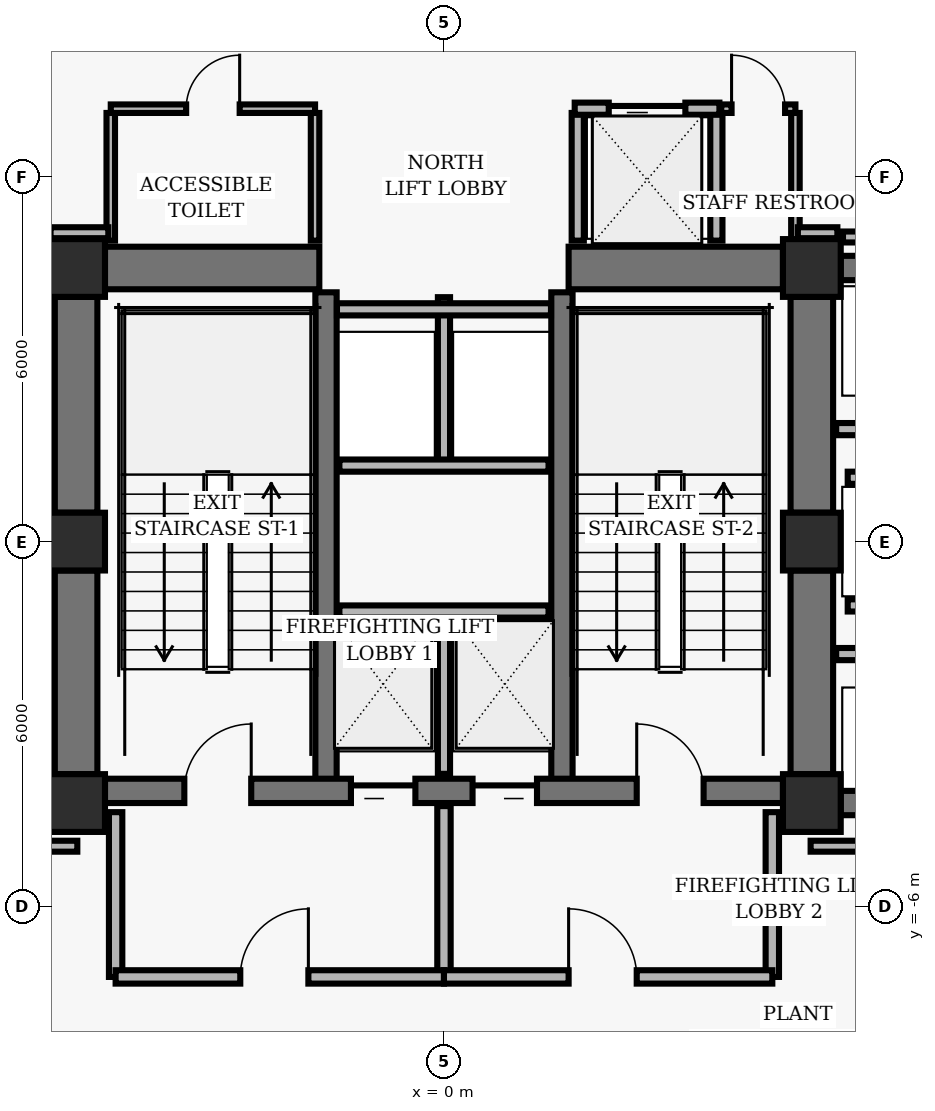
"""IFC4 building model, lengths in metres.
Left out: names, types, materials, properties, quantities, classifications, styles, units other than length and angle.
Written with IfcOpenShell. Run it as: python <this file> out.ifc"""

import sys

from ifc_helpers import new_model, si_unit, direction, frame, frame_2d, origin, origin_2d, place, context, subcontext, project, spatial, rectangle, hollow_rectangle, extrude, element, fill, save


model = new_model("IFC4")
c1 = context("Model", 3, precision=1e-05, world=origin(), true_north=direction((0.0, 1.0)))
c2 = subcontext(c1, "Body", "Model", "MODEL_VIEW")
j1 = project(units=[si_unit("LENGTHUNIT", "METRE"), si_unit("PLANEANGLEUNIT", "RADIAN")], contexts=[c1])
p1 = place(None, origin())
s1 = spatial("IfcSite", under=j1, at=p1, CompositionType="ELEMENT")
p2 = place(p1, origin())
s2 = spatial("IfcBuilding", under=s1, at=p2, CompositionType="ELEMENT")
p3 = place(p2, frame((0.0, 0.0, 45.76)))
s3 = spatial("IfcBuildingStorey", under=s2, at=p3, CompositionType="ELEMENT", Elevation=45.76)
for number, where, z_axis, x_axis in (
    (1, (-6.05, 4.5, 0.0), (0.0, 0.0, 1.0), (1.0, 0.0, 0.0)),
    (2, (6.05, 4.5, 0.0), (0.0, 0.0, 1.0), (1.0, 0.0, 0.0)),
    (3, (-6.05, 0.0, 0.0), (0.0, 0.0, 1.0), (1.0, 0.0, 0.0)),
    (4, (6.05, 0.0, 0.0), (0.0, 0.0, 1.0), (1.0, 0.0, 0.0)),
    (5, (-6.05, -4.3, 0.0), (0.0, 0.0, 1.0), (1.0, 0.0, 0.0)),
    (6, (6.05, -4.3, 0.0), (0.0, 0.0, 1.0), (1.0, 0.0, 0.0)),
):
    element("IfcColumn", number, at=place(p3, frame(where, z_axis=z_axis, x_axis=x_axis)), inside=s3, PredefinedType="COLUMN", context=c2, shape_type="SweptSolid", body=[
        extrude(hollow_rectangle(XDim=0.95, YDim=0.95, WallThickness=0.06, InnerFilletRadius=0.02, OuterFilletRadius=0.04, at=origin_2d()), origin(), (0.0, 0.0, 1.0), 3.84),
    ])
p4 = place(p3, frame((-6.05, 0.475, 0.0), z_axis=(0.0, 0.0, 1.0), x_axis=(0.0, 1.0, 0.0)))
e7 = element("IfcWall", 7, at=p4, inside=s3, PredefinedType="SHEAR", context=c2, shape_type="SweptSolid", body=[
    extrude(rectangle(XDim=3.55, YDim=0.7, at=frame_2d((1.775, 0.0))), origin(), (0.0, 0.0, 1.0), 3.418),
])
p5 = place(p3, frame((-6.05, -3.825, 0.0), z_axis=(0.0, 0.0, 1.0), x_axis=(0.0, 1.0, 0.0)))
e8 = element("IfcWall", 8, at=p5, inside=s3, PredefinedType="SHEAR", context=c2, shape_type="SweptSolid", body=[
    extrude(rectangle(XDim=3.35, YDim=0.7, at=frame_2d((1.675, 0.0))), origin(), (0.0, 0.0, 1.0), 3.418),
])
p6 = place(p3, frame((6.05, 0.475, 0.0), z_axis=(0.0, 0.0, 1.0), x_axis=(0.0, 1.0, 0.0)))
e9 = element("IfcWall", 9, at=p6, inside=s3, PredefinedType="SHEAR", context=c2, shape_type="SweptSolid", body=[
    extrude(rectangle(XDim=3.55, YDim=0.7, at=frame_2d((1.775, 0.0))), origin(), (0.0, 0.0, 1.0), 3.418),
])
p7 = place(p3, frame((6.05, -3.825, 0.0), z_axis=(0.0, 0.0, 1.0), x_axis=(0.0, 1.0, 0.0)))
e10 = element("IfcWall", 10, at=p7, inside=s3, PredefinedType="SHEAR", context=c2, shape_type="SweptSolid", body=[
    extrude(rectangle(XDim=3.35, YDim=0.7, at=frame_2d((1.675, 0.0))), origin(), (0.0, 0.0, 1.0), 3.418),
])
for number, where, z_axis, x_axis in (
    (11, (-1.94, -4.1, 0.0), (0.0, 0.0, 1.0), (0.0, 1.0, 0.0)),
    (12, (1.94, -4.1, 0.0), (0.0, 0.0, 1.0), (0.0, 1.0, 0.0)),
):
    element("IfcWall", number, at=place(p3, frame(where, z_axis=z_axis, x_axis=x_axis)), inside=s3, PredefinedType="SHEAR", context=c2, shape_type="SweptSolid", body=[
        extrude(rectangle(XDim=8.2, YDim=0.35, at=frame_2d((4.1, 0.0))), origin(), (0.0, 0.0, 1.0), 3.418),
    ])
p8 = place(p3, frame((-5.575, -4.1, 0.0), z_axis=(0.0, 0.0, 1.0), x_axis=(1.0, 0.0, 0.0)))
e13 = element("IfcWall", 13, at=p8, inside=s3, PredefinedType="SHEAR", context=c2, shape_type="SweptSolid", body=[
    extrude(rectangle(XDim=11.15, YDim=0.4, at=frame_2d((5.575, 0.0))), origin(), (0.0, 0.0, 1.0), 3.418),
])
p9 = place(p8, frame((1.305, 0.0, 0.0)))
e14 = element("IfcOpeningElement", 14, at=p9, cuts=e13, PredefinedType="OPENING", context=c2, shape_type="SweptSolid", body=[
    extrude(rectangle(XDim=1.1, YDim=2.04, at=frame_2d((0.55, 1.02))), frame((0.0, 0.21, 0.0), z_axis=(0.0, -1.0, 0.0), x_axis=(1.0, 0.0, 0.0)), (0.0, 0.0, 1.0), 0.42),
])
p10 = place(p8, frame((8.745, 0.0, 0.0)))
e15 = element("IfcOpeningElement", 15, at=p10, cuts=e13, PredefinedType="OPENING", context=c2, shape_type="SweptSolid", body=[
    extrude(rectangle(XDim=1.1, YDim=2.04, at=frame_2d((0.55, 1.02))), frame((0.0, 0.21, 0.0), z_axis=(0.0, -1.0, 0.0), x_axis=(1.0, 0.0, 0.0)), (0.0, 0.0, 1.0), 0.42),
])
p11 = place(p8, frame((4.045, 0.0, 0.0)))
e16 = element("IfcOpeningElement", 16, at=p11, cuts=e13, PredefinedType="OPENING", context=c2, shape_type="SweptSolid", body=[
    extrude(rectangle(XDim=1.06, YDim=2.04, at=frame_2d((0.53, 1.02))), frame((0.0, 0.21, 0.0), z_axis=(0.0, -1.0, 0.0), x_axis=(1.0, 0.0, 0.0)), (0.0, 0.0, 1.0), 0.42),
])
p12 = place(p8, frame((6.045, 0.0, 0.0)))
e17 = element("IfcOpeningElement", 17, at=p12, cuts=e13, PredefinedType="OPENING", context=c2, shape_type="SweptSolid", body=[
    extrude(rectangle(XDim=1.06, YDim=2.04, at=frame_2d((0.53, 1.02))), frame((0.0, 0.21, 0.0), z_axis=(0.0, -1.0, 0.0), x_axis=(1.0, 0.0, 0.0)), (0.0, 0.0, 1.0), 0.42),
])
for number, where, z_axis, x_axis in (
    (18, (-5.575, 4.5, 0.0), (0.0, 0.0, 1.0), (1.0, 0.0, 0.0)),
    (19, (2.05, 4.5, 0.0), (0.0, 0.0, 1.0), (1.0, 0.0, 0.0)),
):
    element("IfcWall", number, at=place(p3, frame(where, z_axis=z_axis, x_axis=x_axis)), inside=s3, PredefinedType="SHEAR", context=c2, shape_type="SweptSolid", body=[
        extrude(rectangle(XDim=3.525, YDim=0.7, at=frame_2d((1.762, 0.0))), origin(), (0.0, 0.0, 1.0), 3.418),
    ])
for number, where, z_axis, x_axis in (
    (20, (6.525, 4.5, 0.0), (0.0, 0.0, 1.0), (1.0, 0.0, 0.0)),
    (21, (6.525, -4.3, 0.0), (0.0, 0.0, 1.0), (1.0, 0.0, 0.0)),
):
    element("IfcWall", number, at=place(p3, frame(where, z_axis=z_axis, x_axis=x_axis)), inside=s3, PredefinedType="SHEAR", context=c2, shape_type="SweptSolid", body=[
        extrude(rectangle(XDim=1.95, YDim=0.4, at=frame_2d((0.975, 0.0))), origin(), (0.0, 0.0, 1.0), 3.418),
    ])
p13 = place(p3, frame((0.0, -3.82, 0.0), z_axis=(0.0, 0.0, 1.0), x_axis=(0.0, 1.0, 0.0)))
e22 = element("IfcWall", 22, at=p13, inside=s3, PredefinedType="PARTITIONING", context=c2, shape_type="SweptSolid", body=[
    extrude(rectangle(XDim=2.67, YDim=0.2, at=frame_2d((1.335, 0.0))), origin(), (0.0, 0.0, 1.0), 3.393),
])
p14 = place(p3, frame((-1.72, -1.15, 0.0), z_axis=(0.0, 0.0, 1.0), x_axis=(1.0, 0.0, 0.0)))
e23 = element("IfcWall", 23, at=p14, inside=s3, PredefinedType="PARTITIONING", context=c2, shape_type="SweptSolid", body=[
    extrude(rectangle(XDim=3.44, YDim=0.2, at=frame_2d((1.72, 0.0))), origin(), (0.0, 0.0, 1.0), 3.393),
])
for number, where, z_axis, x_axis in (
    (24, (-5.4, -7.16, 0.0), (0.0, 0.0, 1.0), (0.0, 1.0, 0.0)),
    (25, (5.4, -7.16, 0.0), (0.0, 0.0, 1.0), (0.0, 1.0, 0.0)),
):
    element("IfcWall", number, at=place(p3, frame(where, z_axis=z_axis, x_axis=x_axis)), inside=s3, PredefinedType="PARTITIONING", context=c2, shape_type="SweptSolid", body=[
        extrude(rectangle(XDim=2.71, YDim=0.22, at=frame_2d((1.355, 0.0))), origin(), (0.0, 0.0, 1.0), 3.393),
    ])
p15 = place(p3, frame((0.0, -7.16, 0.0), z_axis=(0.0, 0.0, 1.0), x_axis=(0.0, 1.0, 0.0)))
e26 = element("IfcWall", 26, at=p15, inside=s3, PredefinedType="PARTITIONING", context=c2, shape_type="SweptSolid", body=[
    extrude(rectangle(XDim=2.81, YDim=0.22, at=frame_2d((1.405, 0.0))), origin(), (0.0, 0.0, 1.0), 3.393),
])
p16 = place(p3, frame((-5.4, -7.16, 0.0), z_axis=(0.0, 0.0, 1.0), x_axis=(1.0, 0.0, 0.0)))
e27 = element("IfcWall", 27, at=p16, inside=s3, PredefinedType="PARTITIONING", context=c2, shape_type="SweptSolid", body=[
    extrude(rectangle(XDim=5.4, YDim=0.22, at=frame_2d((2.7, 0.0))), origin(), (0.0, 0.0, 1.0), 3.393),
])
p17 = place(p16, frame((2.05, 0.0, 0.0)))
e28 = element("IfcOpeningElement", 28, at=p17, cuts=e27, PredefinedType="OPENING", context=c2, shape_type="SweptSolid", body=[
    extrude(rectangle(XDim=1.12, YDim=2.02, at=frame_2d((0.56, 1.01))), frame((0.0, 0.12, 0.0), z_axis=(0.0, -1.0, 0.0), x_axis=(1.0, 0.0, 0.0)), (0.0, 0.0, 1.0), 0.24),
])
p18 = place(p3, frame((0.0, -7.16, 0.0), z_axis=(0.0, 0.0, 1.0), x_axis=(1.0, 0.0, 0.0)))
e29 = element("IfcWall", 29, at=p18, inside=s3, PredefinedType="PARTITIONING", context=c2, shape_type="SweptSolid", body=[
    extrude(rectangle(XDim=5.4, YDim=0.22, at=frame_2d((2.7, 0.0))), origin(), (0.0, 0.0, 1.0), 3.393),
])
p19 = place(p18, frame((2.05, 0.0, 0.0)))
e30 = element("IfcOpeningElement", 30, at=p19, cuts=e29, PredefinedType="OPENING", context=c2, shape_type="SweptSolid", body=[
    extrude(rectangle(XDim=1.12, YDim=2.02, at=frame_2d((0.56, 1.01))), frame((0.0, 0.12, 0.0), z_axis=(0.0, -1.0, 0.0), x_axis=(1.0, 0.0, 0.0)), (0.0, 0.0, 1.0), 0.24),
])
p20 = place(p3, frame((0.0, 1.25, 0.0), z_axis=(0.0, 0.0, 1.0), x_axis=(0.0, 1.0, 0.0)))
e31 = element("IfcWall", 31, at=p20, inside=s3, PredefinedType="PARTITIONING", context=c2, shape_type="SweptSolid", body=[
    extrude(rectangle(XDim=2.77, YDim=0.2, at=frame_2d((1.385, 0.0))), origin(), (0.0, 0.0, 1.0), 3.393),
])
p21 = place(p3, frame((-1.72, 1.25, 0.0), z_axis=(0.0, 0.0, 1.0), x_axis=(1.0, 0.0, 0.0)))
e32 = element("IfcWall", 32, at=p21, inside=s3, PredefinedType="PARTITIONING", context=c2, shape_type="SweptSolid", body=[
    extrude(rectangle(XDim=3.44, YDim=0.2, at=frame_2d((1.72, 0.0))), origin(), (0.0, 0.0, 1.0), 3.393),
])
p22 = place(p3, frame((-1.76, 3.82, 0.0), z_axis=(0.0, 0.0, 1.0), x_axis=(1.0, 0.0, 0.0)))
e33 = element("IfcWall", 33, at=p22, inside=s3, PredefinedType="PARTITIONING", context=c2, shape_type="SweptSolid", body=[
    extrude(rectangle(XDim=3.52, YDim=0.2, at=frame_2d((1.76, 0.0))), origin(), (0.0, 0.0, 1.0), 3.393),
])
for number, where, z_axis, x_axis in (
    (34, (2.2, 4.95, 0.0), (0.0, 0.0, 1.0), (0.0, 1.0, 0.0)),
    (35, (4.48, 4.95, 0.0), (0.0, 0.0, 1.0), (0.0, 1.0, 0.0)),
):
    element("IfcWall", number, at=place(p3, frame(where, z_axis=z_axis, x_axis=x_axis)), inside=s3, PredefinedType="PARTITIONING", context=c2, shape_type="SweptSolid", body=[
        extrude(rectangle(XDim=2.1, YDim=0.2, at=frame_2d((1.05, 0.0))), origin(), (0.0, 0.0, 1.0), 3.393),
    ])
p23 = place(p3, frame((2.15, 7.12, 0.0), z_axis=(0.0, 0.0, 1.0), x_axis=(1.0, 0.0, 0.0)))
e36 = element("IfcWall", 36, at=p23, inside=s3, PredefinedType="PARTITIONING", context=c2, shape_type="SweptSolid", body=[
    extrude(rectangle(XDim=2.38, YDim=0.2, at=frame_2d((1.19, 0.0))), origin(), (0.0, 0.0, 1.0), 3.393),
])
p24 = place(p23, frame((0.56, 0.0, 0.0)))
e37 = element("IfcOpeningElement", 37, at=p24, cuts=e36, PredefinedType="OPENING", context=c2, shape_type="SweptSolid", body=[
    extrude(rectangle(XDim=1.26, YDim=2.06, at=frame_2d((0.63, 1.03))), frame((0.0, 0.11, 0.0), z_axis=(0.0, -1.0, 0.0), x_axis=(1.0, 0.0, 0.0)), (0.0, 0.0, 1.0), 0.22),
])
for number, where, z_axis, x_axis in (
    (38, (-5.48, 4.95, 0.0), (0.0, 0.0, 1.0), (0.0, 1.0, 0.0)),
    (39, (-2.12, 4.95, 0.0), (0.0, 0.0, 1.0), (0.0, 1.0, 0.0)),
):
    element("IfcWall", number, at=place(p3, frame(where, z_axis=z_axis, x_axis=x_axis)), inside=s3, PredefinedType="PARTITIONING", context=c2, shape_type="SweptSolid", body=[
        extrude(rectangle(XDim=2.1, YDim=0.14, at=frame_2d((1.05, 0.0))), origin(), (0.0, 0.0, 1.0), 3.393),
    ])
p25 = place(p3, frame((-5.48, 7.12, 0.0), z_axis=(0.0, 0.0, 1.0), x_axis=(1.0, 0.0, 0.0)))
e40 = element("IfcWall", 40, at=p25, inside=s3, PredefinedType="PARTITIONING", context=c2, shape_type="SweptSolid", body=[
    extrude(rectangle(XDim=3.36, YDim=0.14, at=frame_2d((1.68, 0.0))), origin(), (0.0, 0.0, 1.0), 3.393),
])
p26 = place(p25, frame((1.24, 0.0, 0.0)))
e41 = element("IfcOpeningElement", 41, at=p26, cuts=e40, PredefinedType="OPENING", context=c2, shape_type="SweptSolid", body=[
    extrude(rectangle(XDim=0.88, YDim=2.02, at=frame_2d((0.44, 1.01))), frame((0.0, 0.08, 0.0), z_axis=(0.0, -1.0, 0.0), x_axis=(1.0, 0.0, 0.0)), (0.0, 0.0, 1.0), 0.16),
])
p27 = place(p3, frame((5.78, 4.95, 0.0), z_axis=(0.0, 0.0, 1.0), x_axis=(0.0, 1.0, 0.0)))
e42 = element("IfcWall", 42, at=p27, inside=s3, PredefinedType="PARTITIONING", context=c2, shape_type="SweptSolid", body=[
    extrude(rectangle(XDim=2.1, YDim=0.14, at=frame_2d((1.05, 0.0))), origin(), (0.0, 0.0, 1.0), 3.393),
])
p28 = place(p3, frame((4.56, 7.12, 0.0), z_axis=(0.0, 0.0, 1.0), x_axis=(1.0, 0.0, 0.0)))
e43 = element("IfcWall", 43, at=p28, inside=s3, PredefinedType="PARTITIONING", context=c2, shape_type="SweptSolid", body=[
    extrude(rectangle(XDim=1.22, YDim=0.14, at=frame_2d((0.61, 0.0))), origin(), (0.0, 0.0, 1.0), 3.393),
])
p29 = place(p28, frame((0.17, 0.0, 0.0)))
e44 = element("IfcOpeningElement", 44, at=p29, cuts=e43, PredefinedType="OPENING", context=c2, shape_type="SweptSolid", body=[
    extrude(rectangle(XDim=0.88, YDim=2.02, at=frame_2d((0.44, 1.01))), frame((0.0, 0.08, 0.0), z_axis=(0.0, -1.0, 0.0), x_axis=(1.0, 0.0, 0.0)), (0.0, 0.0, 1.0), 0.16),
])
for number, where, z_axis, x_axis in (
    (45, (6.45, -1.85, 0.0), (0.0, 0.0, 1.0), (1.0, 0.0, 0.0)),
    (46, (6.45, 1.85, 0.0), (0.0, 0.0, 1.0), (1.0, 0.0, 0.0)),
):
    element("IfcWall", number, at=place(p3, frame(where, z_axis=z_axis, x_axis=x_axis)), inside=s3, PredefinedType="PARTITIONING", context=c2, shape_type="SweptSolid", body=[
        extrude(rectangle(XDim=2.1, YDim=0.2, at=frame_2d((1.05, 0.0))), origin(), (0.0, 0.0, 1.0), 3.393),
    ])
for number, where, z_axis, x_axis in (
    (47, (6.64, -1.05, 0.0), (0.0, 0.0, 1.0), (1.0, 0.0, 0.0)),
    (48, (6.64, 1.05, 0.0), (0.0, 0.0, 1.0), (1.0, 0.0, 0.0)),
):
    element("IfcWall", number, at=place(p3, frame(where, z_axis=z_axis, x_axis=x_axis)), inside=s3, PredefinedType="PARTITIONING", context=c2, shape_type="SweptSolid", body=[
        extrude(rectangle(XDim=1.91, YDim=0.2, at=frame_2d((0.955, 0.0))), origin(), (0.0, 0.0, 1.0), 3.393),
    ])
p30 = place(p3, frame((11.467, -5.14, 0.0), z_axis=(0.0, 0.0, 1.0), x_axis=(-0.746516597114, -0.665366793756, 0.0)))
e49 = element("IfcWall", 49, at=p30, inside=s3, PredefinedType="PARTITIONING", context=c2, shape_type="SweptSolid", body=[
    extrude(rectangle(XDim=6.342, YDim=0.18, at=frame_2d((3.171, 0.0))), origin(), (0.0, 0.0, 1.0), 2.907),
])
for number, where, z_axis, x_axis in (
    (50, (-9.37, -5.01, 0.0), (0.0, 0.0, 1.0), (1.0, 0.0, 0.0)),
    (51, (6.03, -5.01, 0.0), (0.0, 0.0, 1.0), (1.0, 0.0, 0.0)),
):
    element("IfcWall", number, at=place(p3, frame(where, z_axis=z_axis, x_axis=x_axis)), inside=s3, PredefinedType="PARTITIONING", context=c2, shape_type="SweptSolid", body=[
        extrude(rectangle(XDim=3.34, YDim=0.18, at=frame_2d((1.67, 0.0))), origin(), (0.0, 0.0, 1.0), 3.393),
    ])
p31 = place(p3, frame((9.37, 5.01, 0.0), z_axis=(0.0, 0.0, 1.0), x_axis=(-1.0, 0.0, 0.0)))
e52 = element("IfcWall", 52, at=p31, inside=s3, PredefinedType="PARTITIONING", context=c2, shape_type="SweptSolid", body=[
    extrude(rectangle(XDim=2.808, YDim=0.18, at=frame_2d((1.404, 0.0))), origin(), (0.0, 0.0, 1.0), 3.393),
])
p32 = place(p3, frame((6.47, 5.08, 0.0), z_axis=(0.0, 0.0, 1.0), x_axis=(-1.0, 0.0, 0.0)))
e53 = element("IfcWall", 53, at=p32, inside=s3, PredefinedType="PARTITIONING", context=c2, shape_type="SweptSolid", body=[
    extrude(rectangle(XDim=0.65, YDim=0.18, at=frame_2d((0.325, 0.0))), origin(), (0.0, 0.0, 1.0), 3.393),
])
p33 = place(p3, frame((-5.52, 5.08, 0.0), z_axis=(0.0, 0.0, 1.0), x_axis=(-1.0, 0.0, 0.0)))
e54 = element("IfcWall", 54, at=p33, inside=s3, PredefinedType="PARTITIONING", context=c2, shape_type="SweptSolid", body=[
    extrude(rectangle(XDim=0.95, YDim=0.18, at=frame_2d((0.475, 0.0))), origin(), (0.0, 0.0, 1.0), 3.393),
])
p34 = place(p9, origin())
e55 = element("IfcDoor", 55, at=p34, inside=s3, OperationType="SINGLE_SWING_RIGHT", PredefinedType="DOOR", context=c2, shape_type="SweptSolid", body=[
    extrude(rectangle(XDim=1.1, YDim=2.04, at=frame_2d((0.55, 1.02))), frame((0.0, 0.025, 0.0), z_axis=(0.0, -1.0, 0.0), x_axis=(1.0, 0.0, 0.0)), (0.0, 0.0, 1.0), 0.05),
])
fill(e14, e55)
p35 = place(p10, origin())
e56 = element("IfcDoor", 56, at=p35, inside=s3, OperationType="SINGLE_SWING_LEFT", PredefinedType="DOOR", context=c2, shape_type="SweptSolid", body=[
    extrude(rectangle(XDim=1.1, YDim=2.04, at=frame_2d((0.55, 1.02))), frame((0.0, 0.025, 0.0), z_axis=(0.0, -1.0, 0.0), x_axis=(1.0, 0.0, 0.0)), (0.0, 0.0, 1.0), 0.05),
])
fill(e15, e56)
p36 = place(p11, origin())
e57 = element("IfcDoor", 57, at=p36, inside=s3, OperationType="SLIDING_TO_LEFT", PredefinedType="DOOR", context=c2, shape_type="SweptSolid", body=[
    extrude(rectangle(XDim=1.06, YDim=2.04, at=frame_2d((0.53, 1.02))), frame((0.0, 0.025, 0.0), z_axis=(0.0, -1.0, 0.0), x_axis=(1.0, 0.0, 0.0)), (0.0, 0.0, 1.0), 0.05),
])
fill(e16, e57)
p37 = place(p12, origin())
e58 = element("IfcDoor", 58, at=p37, inside=s3, OperationType="SLIDING_TO_RIGHT", PredefinedType="DOOR", context=c2, shape_type="SweptSolid", body=[
    extrude(rectangle(XDim=1.06, YDim=2.04, at=frame_2d((0.53, 1.02))), frame((0.0, 0.025, 0.0), z_axis=(0.0, -1.0, 0.0), x_axis=(1.0, 0.0, 0.0)), (0.0, 0.0, 1.0), 0.05),
])
fill(e17, e58)
p38 = place(p17, origin())
e59 = element("IfcDoor", 59, at=p38, inside=s3, OperationType="SINGLE_SWING_RIGHT", PredefinedType="DOOR", context=c2, shape_type="SweptSolid", body=[
    extrude(rectangle(XDim=1.12, YDim=2.02, at=frame_2d((0.56, 1.01))), frame((0.0, 0.025, 0.0), z_axis=(0.0, -1.0, 0.0), x_axis=(1.0, 0.0, 0.0)), (0.0, 0.0, 1.0), 0.05),
])
fill(e28, e59)
p39 = place(p19, origin())
e60 = element("IfcDoor", 60, at=p39, inside=s3, OperationType="SINGLE_SWING_LEFT", PredefinedType="DOOR", context=c2, shape_type="SweptSolid", body=[
    extrude(rectangle(XDim=1.12, YDim=2.02, at=frame_2d((0.56, 1.01))), frame((0.0, 0.025, 0.0), z_axis=(0.0, -1.0, 0.0), x_axis=(1.0, 0.0, 0.0)), (0.0, 0.0, 1.0), 0.05),
])
fill(e30, e60)
p40 = place(p24, origin())
e61 = element("IfcDoor", 61, at=p40, inside=s3, OperationType="SLIDING_TO_LEFT", PredefinedType="DOOR", context=c2, shape_type="SweptSolid", body=[
    extrude(rectangle(XDim=1.26, YDim=2.06, at=frame_2d((0.63, 1.03))), frame((0.0, 0.025, 0.0), z_axis=(0.0, -1.0, 0.0), x_axis=(1.0, 0.0, 0.0)), (0.0, 0.0, 1.0), 0.05),
])
fill(e37, e61)
p41 = place(p26, origin())
e62 = element("IfcDoor", 62, at=p41, inside=s3, OperationType="SINGLE_SWING_RIGHT", PredefinedType="DOOR", context=c2, shape_type="SweptSolid", body=[
    extrude(rectangle(XDim=0.88, YDim=2.02, at=frame_2d((0.44, 1.01))), frame((0.0, 0.025, 0.0), z_axis=(0.0, -1.0, 0.0), x_axis=(1.0, 0.0, 0.0)), (0.0, 0.0, 1.0), 0.05),
])
fill(e41, e62)
p42 = place(p29, origin())
e63 = element("IfcDoor", 63, at=p42, inside=s3, OperationType="SINGLE_SWING_LEFT", PredefinedType="DOOR", context=c2, shape_type="SweptSolid", body=[
    extrude(rectangle(XDim=0.88, YDim=2.02, at=frame_2d((0.44, 1.01))), frame((0.0, 0.025, 0.0), z_axis=(0.0, -1.0, 0.0), x_axis=(1.0, 0.0, 0.0)), (0.0, 0.0, 1.0), 0.05),
])
fill(e44, e63)
save(model, sys.argv[1])
